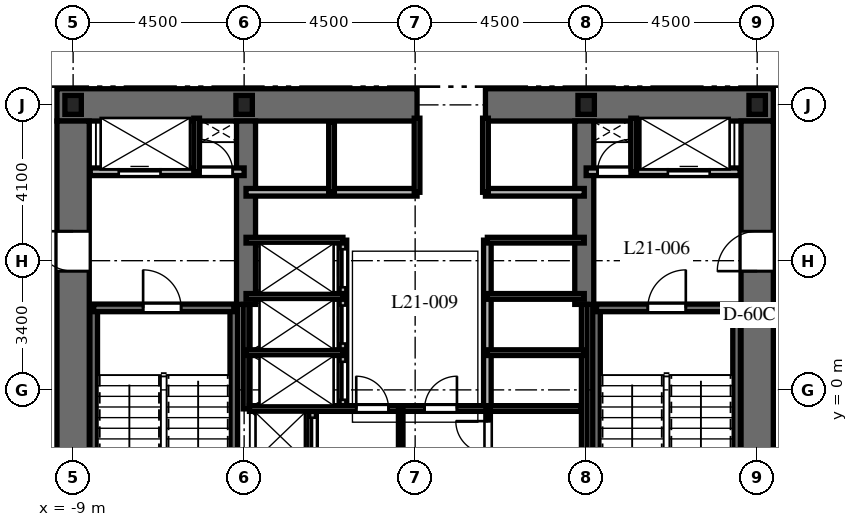
"""IFC4 building model, lengths in metres.
Left out: names, types, materials, properties, quantities, classifications, styles, units other than length and angle.
Written with IfcOpenShell. Run it as: python <this file> out.ifc"""

import sys

from ifc_helpers import new_model, si_unit, direction, frame, frame_2d, origin, origin_2d, place, context, subcontext, project, spatial, rectangle, i_section, extrude, element, fill, save


model = new_model("IFC4")
c1 = context("Model", 3, precision=1e-05, world=origin(), true_north=direction((0.0, 1.0)))
c2 = subcontext(c1, "Body", "Model", "MODEL_VIEW")
j1 = project(units=[si_unit("LENGTHUNIT", "METRE"), si_unit("PLANEANGLEUNIT", "RADIAN")], contexts=[c1])
p1 = place(None, origin())
s1 = spatial("IfcSite", under=j1, at=p1, CompositionType="ELEMENT")
p2 = place(p1, origin())
s2 = spatial("IfcBuilding", under=s1, at=p2, CompositionType="ELEMENT")
p3 = place(p2, frame((0.0, 0.0, 91.4)))
s3 = spatial("IfcBuildingStorey", under=s2, at=p3, CompositionType="ELEMENT", Elevation=91.4)
p4 = place(p3, frame((-9.425, 7.5, 0.0), z_axis=(0.0, 0.0, 1.0), x_axis=(1.0, 0.0, 0.0)))
e1 = element("IfcWall", 1, at=p4, inside=s3, PredefinedType="SHEAR", context=c2, shape_type="SweptSolid", body=[
    extrude(rectangle(XDim=9.475, YDim=0.85, at=frame_2d((4.738, 0.0))), origin(), (0.0, 0.0, 1.0), 3.7),
])
p5 = place(p3, frame((1.85, 7.5, 0.0), z_axis=(0.0, 0.0, 1.0), x_axis=(1.0, 0.0, 0.0)))
e2 = element("IfcWall", 2, at=p5, inside=s3, PredefinedType="SHEAR", context=c2, shape_type="SweptSolid", body=[
    extrude(rectangle(XDim=7.575, YDim=0.85, at=frame_2d((3.788, 0.0))), origin(), (0.0, 0.0, 1.0), 3.7),
])
p6 = place(p3, frame((-9.0, -7.075, 0.0), z_axis=(0.0, 0.0, 1.0), x_axis=(0.0, 1.0, 0.0)))
e3 = element("IfcWall", 3, at=p6, inside=s3, PredefinedType="SHEAR", context=c2, shape_type="SweptSolid", body=[
    extrude(rectangle(XDim=14.15, YDim=0.85, at=frame_2d((7.075, 0.0))), origin(), (0.0, 0.0, 1.0), 3.7),
])
p7 = place(p6, frame((10.2, 0.0, 0.0)))
e4 = element("IfcOpeningElement", 4, at=p7, cuts=e3, PredefinedType="OPENING", context=c2, shape_type="SweptSolid", body=[
    extrude(rectangle(XDim=1.05, YDim=2.15, at=frame_2d((0.525, 1.075))), frame((0.0, 0.435, 0.0), z_axis=(0.0, -1.0, 0.0), x_axis=(1.0, 0.0, 0.0)), (0.0, 0.0, 1.0), 0.87),
])
p8 = place(p3, frame((9.0, -7.075, 0.0), z_axis=(0.0, 0.0, 1.0), x_axis=(0.0, 1.0, 0.0)))
e5 = element("IfcWall", 5, at=p8, inside=s3, PredefinedType="SHEAR", context=c2, shape_type="SweptSolid", body=[
    extrude(rectangle(XDim=14.15, YDim=0.85, at=frame_2d((7.075, 0.0))), origin(), (0.0, 0.0, 1.0), 3.7),
])
p9 = place(p8, frame((10.2, 0.0, 0.0)))
e6 = element("IfcOpeningElement", 6, at=p9, cuts=e5, PredefinedType="OPENING", context=c2, shape_type="SweptSolid", body=[
    extrude(rectangle(XDim=1.05, YDim=2.15, at=frame_2d((0.525, 1.075))), frame((0.0, 0.435, 0.0), z_axis=(0.0, -1.0, 0.0), x_axis=(1.0, 0.0, 0.0)), (0.0, 0.0, 1.0), 0.87),
])
for number, where, z_axis, x_axis in (
    (7, (-4.45, 2.25, 0.0), (0.0, 0.0, 1.0), (0.0, 1.0, 0.0)),
    (8, (4.45, 2.25, 0.0), (0.0, 0.0, 1.0), (0.0, 1.0, 0.0)),
):
    element("IfcWall", number, at=place(p3, frame(where, z_axis=z_axis, x_axis=x_axis)), inside=s3, PredefinedType="SHEAR", context=c2, shape_type="SweptSolid", body=[
        extrude(rectangle(XDim=4.825, YDim=0.5, at=frame_2d((2.413, 0.0))), origin(), (0.0, 0.0, 1.0), 3.7),
    ])
for number, where, z_axis, x_axis in (
    (9, (-8.458, -6.985, 0.0), (0.0, 0.0, 1.0), (0.0, 1.0, 0.0)),
    (10, (-4.772, -6.985, 0.0), (0.0, 0.0, 1.0), (0.0, 1.0, 0.0)),
):
    element("IfcWall", number, at=place(p3, frame(where, z_axis=z_axis, x_axis=x_axis)), inside=s3, PredefinedType="SHEAR", context=c2, shape_type="SweptSolid", body=[
        extrude(rectangle(XDim=9.143, YDim=0.2, at=frame_2d((4.572, 0.0))), origin(), (0.0, 0.0, 1.0), 3.7),
    ])
p10 = place(p3, frame((-8.458, 2.158, 0.0), z_axis=(0.0, 0.0, 1.0), x_axis=(1.0, 0.0, 0.0)))
e11 = element("IfcWall", 11, at=p10, inside=s3, PredefinedType="SHEAR", context=c2, shape_type="SweptSolid", body=[
    extrude(rectangle(XDim=3.686, YDim=0.2, at=frame_2d((1.843, 0.0))), origin(), (0.0, 0.0, 1.0), 3.7),
])
p11 = place(p10, frame((1.3, 0.0, 0.0)))
e12 = element("IfcOpeningElement", 12, at=p11, cuts=e11, PredefinedType="OPENING", context=c2, shape_type="SweptSolid", body=[
    extrude(rectangle(XDim=1.0, YDim=2.15, at=frame_2d((0.5, 1.075))), frame((0.0, 0.11, 0.0), z_axis=(0.0, -1.0, 0.0), x_axis=(1.0, 0.0, 0.0)), (0.0, 0.0, 1.0), 0.22),
])
for number, where, z_axis, x_axis in (
    (13, (4.772, -6.985, 0.0), (0.0, 0.0, 1.0), (0.0, 1.0, 0.0)),
    (14, (8.458, -6.985, 0.0), (0.0, 0.0, 1.0), (0.0, 1.0, 0.0)),
):
    element("IfcWall", number, at=place(p3, frame(where, z_axis=z_axis, x_axis=x_axis)), inside=s3, PredefinedType="SHEAR", context=c2, shape_type="SweptSolid", body=[
        extrude(rectangle(XDim=9.143, YDim=0.2, at=frame_2d((4.572, 0.0))), origin(), (0.0, 0.0, 1.0), 3.7),
    ])
p12 = place(p3, frame((4.772, 2.158, 0.0), z_axis=(0.0, 0.0, 1.0), x_axis=(1.0, 0.0, 0.0)))
e15 = element("IfcWall", 15, at=p12, inside=s3, PredefinedType="SHEAR", context=c2, shape_type="SweptSolid", body=[
    extrude(rectangle(XDim=3.686, YDim=0.2, at=frame_2d((1.843, 0.0))), origin(), (0.0, 0.0, 1.0), 3.7),
])
p13 = place(p12, frame((1.35, 0.0, 0.0)))
e16 = element("IfcOpeningElement", 16, at=p13, cuts=e15, PredefinedType="OPENING", context=c2, shape_type="SweptSolid", body=[
    extrude(rectangle(XDim=1.0, YDim=2.15, at=frame_2d((0.5, 1.075))), frame((0.0, 0.11, 0.0), z_axis=(0.0, -1.0, 0.0), x_axis=(1.0, 0.0, 0.0)), (0.0, 0.0, 1.0), 0.22),
])
for number, where, z_axis, x_axis in (
    (17, (9.0, 7.5, 0.0), (0.0, 0.0, 1.0), (1.0, 0.0, 0.0)),
    (18, (4.5, 7.5, 0.0), (0.0, 0.0, 1.0), (1.0, 0.0, 0.0)),
    (19, (-4.5, 7.5, 0.0), (0.0, 0.0, 1.0), (1.0, 0.0, 0.0)),
    (20, (-9.0, 7.5, 0.0), (0.0, 0.0, 1.0), (1.0, 0.0, 0.0)),
):
    element("IfcColumn", number, at=place(p3, frame(where, z_axis=z_axis, x_axis=x_axis)), inside=s3, PredefinedType="COLUMN", context=c2, shape_type="SweptSolid", body=[
        extrude(i_section(OverallWidth=0.432, OverallDepth=0.498, WebThickness=0.056, FlangeThickness=0.089, at=origin_2d()), origin(), (0.0, 0.0, 1.0), 3.7),
    ])
p14 = place(p3, frame((-8.55, 5.74, 0.0), z_axis=(0.0, 0.0, 1.0), x_axis=(1.0, 0.0, 0.0)))
e21 = element("IfcWall", 21, at=p14, inside=s3, PredefinedType="PARTITIONING", context=c2, shape_type="SweptSolid", body=[
    extrude(rectangle(XDim=4.05, YDim=0.2, at=frame_2d((2.025, 0.0))), origin(), (0.0, 0.0, 1.0), 3.4),
])
p15 = place(p14, frame((0.75, 0.0, 0.0)))
e22 = element("IfcOpeningElement", 22, at=p15, cuts=e21, PredefinedType="OPENING", context=c2, shape_type="SweptSolid", body=[
    extrude(rectangle(XDim=1.1, YDim=2.2, at=frame_2d((0.55, 1.1))), frame((0.0, 0.11, 0.0), z_axis=(0.0, -1.0, 0.0), x_axis=(1.0, 0.0, 0.0)), (0.0, 0.0, 1.0), 0.22),
])
p16 = place(p14, frame((2.9, 0.0, 0.0)))
e23 = element("IfcOpeningElement", 23, at=p16, cuts=e21, PredefinedType="OPENING", context=c2, shape_type="SweptSolid", body=[
    extrude(rectangle(XDim=0.85, YDim=2.03, at=frame_2d((0.425, 1.015))), frame((0.0, 0.11, 0.0), z_axis=(0.0, -1.0, 0.0), x_axis=(1.0, 0.0, 0.0)), (0.0, 0.0, 1.0), 0.22),
])
p17 = place(p3, frame((-5.75, 5.74, 0.0), z_axis=(0.0, 0.0, 1.0), x_axis=(0.0, 1.0, 0.0)))
e24 = element("IfcWall", 24, at=p17, inside=s3, PredefinedType="PARTITIONING", context=c2, shape_type="SweptSolid", body=[
    extrude(rectangle(XDim=1.41, YDim=0.15, at=frame_2d((0.705, 0.0))), origin(), (0.0, 0.0, 1.0), 3.4),
])
p18 = place(p3, frame((4.5, 5.74, 0.0), z_axis=(0.0, 0.0, 1.0), x_axis=(1.0, 0.0, 0.0)))
e25 = element("IfcWall", 25, at=p18, inside=s3, PredefinedType="PARTITIONING", context=c2, shape_type="SweptSolid", body=[
    extrude(rectangle(XDim=4.05, YDim=0.2, at=frame_2d((2.025, 0.0))), origin(), (0.0, 0.0, 1.0), 3.4),
])
p19 = place(p18, frame((0.3, 0.0, 0.0)))
e26 = element("IfcOpeningElement", 26, at=p19, cuts=e25, PredefinedType="OPENING", context=c2, shape_type="SweptSolid", body=[
    extrude(rectangle(XDim=0.85, YDim=2.03, at=frame_2d((0.425, 1.015))), frame((0.0, 0.11, 0.0), z_axis=(0.0, -1.0, 0.0), x_axis=(1.0, 0.0, 0.0)), (0.0, 0.0, 1.0), 0.22),
])
p20 = place(p18, frame((2.15, 0.0, 0.0)))
e27 = element("IfcOpeningElement", 27, at=p20, cuts=e25, PredefinedType="OPENING", context=c2, shape_type="SweptSolid", body=[
    extrude(rectangle(XDim=1.1, YDim=2.2, at=frame_2d((0.55, 1.1))), frame((0.0, 0.11, 0.0), z_axis=(0.0, -1.0, 0.0), x_axis=(1.0, 0.0, 0.0)), (0.0, 0.0, 1.0), 0.22),
])
p21 = place(p3, frame((5.75, 5.74, 0.0), z_axis=(0.0, 0.0, 1.0), x_axis=(0.0, 1.0, 0.0)))
e28 = element("IfcWall", 28, at=p21, inside=s3, PredefinedType="PARTITIONING", context=c2, shape_type="SweptSolid", body=[
    extrude(rectangle(XDim=1.41, YDim=0.15, at=frame_2d((0.705, 0.0))), origin(), (0.0, 0.0, 1.0), 3.4),
])
p22 = place(p3, frame((-2.7, -1.972, 0.0), z_axis=(0.0, 0.0, 1.0), x_axis=(0.0, 1.0, 0.0)))
e29 = element("IfcWall", 29, at=p22, inside=s3, PredefinedType="PARTITIONING", context=c2, shape_type="SweptSolid", body=[
    extrude(rectangle(XDim=1.472, YDim=0.2, at=frame_2d((0.736, 0.0))), origin(), (0.0, 0.0, 1.0), 3.4),
])
p23 = place(p22, frame((0.24, 0.0, 0.0)))
e30 = element("IfcOpeningElement", 30, at=p23, cuts=e29, PredefinedType="OPENING", context=c2, shape_type="SweptSolid", body=[
    extrude(rectangle(XDim=1.0, YDim=2.2, at=frame_2d((0.5, 1.1))), frame((0.0, 0.11, 0.0), z_axis=(0.0, -1.0, 0.0), x_axis=(1.0, 0.0, 0.0)), (0.0, 0.0, 1.0), 0.22),
])
p24 = place(p3, frame((-4.45, 5.2, 0.0), z_axis=(0.0, 0.0, 1.0), x_axis=(1.0, 0.0, 0.0)))
e31 = element("IfcWall", 31, at=p24, inside=s3, PredefinedType="PARTITIONING", context=c2, shape_type="SweptSolid", body=[
    extrude(rectangle(XDim=4.5, YDim=0.2, at=frame_2d((2.25, 0.0))), origin(), (0.0, 0.0, 1.0), 3.4),
])
p25 = place(p3, frame((1.85, 5.2, 0.0), z_axis=(0.0, 0.0, 1.0), x_axis=(1.0, 0.0, 0.0)))
e32 = element("IfcWall", 32, at=p25, inside=s3, PredefinedType="PARTITIONING", context=c2, shape_type="SweptSolid", body=[
    extrude(rectangle(XDim=2.6, YDim=0.2, at=frame_2d((1.3, 0.0))), origin(), (0.0, 0.0, 1.0), 3.4),
])
p26 = place(p3, frame((-2.2, 5.2, 0.0), z_axis=(0.0, 0.0, 1.0), x_axis=(0.0, 1.0, 0.0)))
e33 = element("IfcWall", 33, at=p26, inside=s3, PredefinedType="PARTITIONING", context=c2, shape_type="SweptSolid", body=[
    extrude(rectangle(XDim=1.85, YDim=0.15, at=frame_2d((0.925, 0.0))), origin(), (0.0, 0.0, 1.0), 3.4),
])
for number, where, z_axis, x_axis in (
    (34, (0.05, 5.2, 0.0), (0.0, 0.0, 1.0), (0.0, 1.0, 0.0)),
    (35, (1.85, 5.2, 0.0), (0.0, 0.0, 1.0), (0.0, 1.0, 0.0)),
):
    element("IfcWall", number, at=place(p3, frame(where, z_axis=z_axis, x_axis=x_axis)), inside=s3, PredefinedType="PARTITIONING", context=c2, shape_type="SweptSolid", body=[
        extrude(rectangle(XDim=1.95, YDim=0.15, at=frame_2d((0.975, 0.0))), origin(), (0.0, 0.0, 1.0), 3.4),
    ])
p27 = place(p3, frame((-4.45, -0.5, 0.0), z_axis=(0.0, 0.0, 1.0), x_axis=(0.0, 1.0, 0.0)))
e36 = element("IfcWall", 36, at=p27, inside=s3, PredefinedType="PARTITIONING", context=c2, shape_type="SweptSolid", body=[
    extrude(rectangle(XDim=2.75, YDim=0.15, at=frame_2d((1.375, 0.0))), origin(), (0.0, 0.0, 1.0), 3.4),
])
p28 = place(p3, frame((4.45, -1.972, 0.0), z_axis=(0.0, 0.0, 1.0), x_axis=(0.0, 1.0, 0.0)))
e37 = element("IfcWall", 37, at=p28, inside=s3, PredefinedType="PARTITIONING", context=c2, shape_type="SweptSolid", body=[
    extrude(rectangle(XDim=4.222, YDim=0.15, at=frame_2d((2.111, 0.0))), origin(), (0.0, 0.0, 1.0), 3.4),
])
p29 = place(p3, frame((-1.9, -0.5, 0.0), z_axis=(0.0, 0.0, 1.0), x_axis=(0.0, 1.0, 0.0)))
e38 = element("IfcWall", 38, at=p29, inside=s3, PredefinedType="PARTITIONING", context=c2, shape_type="SweptSolid", body=[
    extrude(rectangle(XDim=4.44, YDim=0.2, at=frame_2d((2.22, 0.0))), origin(), (0.0, 0.0, 1.0), 3.4),
])
p30 = place(p29, frame((0.24, 0.0, 0.0)))
e39 = element("IfcOpeningElement", 39, at=p30, cuts=e38, PredefinedType="OPENING", context=c2, shape_type="SweptSolid", body=[
    extrude(rectangle(XDim=1.0, YDim=2.2, at=frame_2d((0.5, 1.1))), frame((0.0, 0.11, 0.0), z_axis=(0.0, -1.0, 0.0), x_axis=(1.0, 0.0, 0.0)), (0.0, 0.0, 1.0), 0.22),
])
p31 = place(p29, frame((1.72, 0.0, 0.0)))
e40 = element("IfcOpeningElement", 40, at=p31, cuts=e38, PredefinedType="OPENING", context=c2, shape_type="SweptSolid", body=[
    extrude(rectangle(XDim=1.0, YDim=2.2, at=frame_2d((0.5, 1.1))), frame((0.0, 0.11, 0.0), z_axis=(0.0, -1.0, 0.0), x_axis=(1.0, 0.0, 0.0)), (0.0, 0.0, 1.0), 0.22),
])
p32 = place(p29, frame((3.2, 0.0, 0.0)))
e41 = element("IfcOpeningElement", 41, at=p32, cuts=e38, PredefinedType="OPENING", context=c2, shape_type="SweptSolid", body=[
    extrude(rectangle(XDim=1.0, YDim=2.2, at=frame_2d((0.5, 1.1))), frame((0.0, 0.11, 0.0), z_axis=(0.0, -1.0, 0.0), x_axis=(1.0, 0.0, 0.0)), (0.0, 0.0, 1.0), 0.22),
])
for number, where, z_axis, x_axis in (
    (42, (-4.45, 3.94, 0.0), (0.0, 0.0, 1.0), (1.0, 0.0, 0.0)),
    (43, (-4.45, 0.98, 0.0), (0.0, 0.0, 1.0), (1.0, 0.0, 0.0)),
    (44, (-4.45, 2.46, 0.0), (0.0, 0.0, 1.0), (1.0, 0.0, 0.0)),
):
    element("IfcWall", number, at=place(p3, frame(where, z_axis=z_axis, x_axis=x_axis)), inside=s3, PredefinedType="PARTITIONING", context=c2, shape_type="SweptSolid", body=[
        extrude(rectangle(XDim=2.55, YDim=0.15, at=frame_2d((1.275, 0.0))), origin(), (0.0, 0.0, 1.0), 3.4),
    ])
p33 = place(p3, frame((1.9, -0.5, 0.0), z_axis=(0.0, 0.0, 1.0), x_axis=(0.0, 1.0, 0.0)))
e45 = element("IfcWall", 45, at=p33, inside=s3, PredefinedType="PARTITIONING", context=c2, shape_type="SweptSolid", body=[
    extrude(rectangle(XDim=4.44, YDim=0.2, at=frame_2d((2.22, 0.0))), origin(), (0.0, 0.0, 1.0), 3.4),
])
for number, where, z_axis, x_axis in (
    (46, (1.9, 3.94, 0.0), (0.0, 0.0, 1.0), (1.0, 0.0, 0.0)),
    (47, (1.9, 0.98, 0.0), (0.0, 0.0, 1.0), (1.0, 0.0, 0.0)),
    (48, (1.9, 2.46, 0.0), (0.0, 0.0, 1.0), (1.0, 0.0, 0.0)),
):
    element("IfcWall", number, at=place(p3, frame(where, z_axis=z_axis, x_axis=x_axis)), inside=s3, PredefinedType="PARTITIONING", context=c2, shape_type="SweptSolid", body=[
        extrude(rectangle(XDim=2.55, YDim=0.15, at=frame_2d((1.275, 0.0))), origin(), (0.0, 0.0, 1.0), 3.4),
    ])
p34 = place(p3, frame((-4.36, -0.49, 0.0), z_axis=(0.0, 0.0, 1.0), x_axis=(1.0, 0.0, 0.0)))
e49 = element("IfcWall", 49, at=p34, inside=s3, PredefinedType="PARTITIONING", context=c2, shape_type="SweptSolid", body=[
    extrude(rectangle(XDim=8.72, YDim=0.15, at=frame_2d((4.36, 0.0))), origin(), (0.0, 0.0, 1.0), 3.4),
])
p35 = place(p34, frame((2.81, 0.0, 0.0)))
e50 = element("IfcOpeningElement", 50, at=p35, cuts=e49, PredefinedType="OPENING", context=c2, shape_type="SweptSolid", body=[
    extrude(rectangle(XDim=0.85, YDim=2.03, at=frame_2d((0.425, 1.015))), frame((0.0, 0.085, 0.0), z_axis=(0.0, -1.0, 0.0), x_axis=(1.0, 0.0, 0.0)), (0.0, 0.0, 1.0), 0.17),
])
p36 = place(p34, frame((4.61, 0.0, 0.0)))
e51 = element("IfcOpeningElement", 51, at=p36, cuts=e49, PredefinedType="OPENING", context=c2, shape_type="SweptSolid", body=[
    extrude(rectangle(XDim=0.85, YDim=2.03, at=frame_2d((0.425, 1.015))), frame((0.0, 0.085, 0.0), z_axis=(0.0, -1.0, 0.0), x_axis=(1.0, 0.0, 0.0)), (0.0, 0.0, 1.0), 0.17),
])
p37 = place(p3, frame((-0.38, -1.972, 0.0), z_axis=(0.0, 0.0, 1.0), x_axis=(0.0, 1.0, 0.0)))
e52 = element("IfcWall", 52, at=p37, inside=s3, PredefinedType="PARTITIONING", context=c2, shape_type="SweptSolid", body=[
    extrude(rectangle(XDim=1.472, YDim=0.12, at=frame_2d((0.736, 0.0))), origin(), (0.0, 0.0, 1.0), 3.4),
])
p38 = place(p3, frame((1.92, -1.972, 0.0), z_axis=(0.0, 0.0, 1.0), x_axis=(0.0, 1.0, 0.0)))
e53 = element("IfcWall", 53, at=p38, inside=s3, PredefinedType="PARTITIONING", context=c2, shape_type="SweptSolid", body=[
    extrude(rectangle(XDim=1.472, YDim=0.12, at=frame_2d((0.736, 0.0))), origin(), (0.0, 0.0, 1.0), 3.4),
])
p39 = place(p38, frame((0.3, 0.0, 0.0)))
e54 = element("IfcOpeningElement", 54, at=p39, cuts=e53, PredefinedType="OPENING", context=c2, shape_type="SweptSolid", body=[
    extrude(rectangle(XDim=0.85, YDim=2.03, at=frame_2d((0.425, 1.015))), frame((0.0, 0.07, 0.0), z_axis=(0.0, -1.0, 0.0), x_axis=(1.0, 0.0, 0.0)), (0.0, 0.0, 1.0), 0.14),
])
p40 = place(p11, origin())
e55 = element("IfcDoor", 55, at=p40, inside=s3, OperationType="SINGLE_SWING_LEFT", PredefinedType="DOOR", context=c2, shape_type="SweptSolid", body=[
    extrude(rectangle(XDim=1.0, YDim=2.15, at=frame_2d((0.5, 1.075))), frame((0.0, 0.025, 0.0), z_axis=(0.0, -1.0, 0.0), x_axis=(1.0, 0.0, 0.0)), (0.0, 0.0, 1.0), 0.05),
])
fill(e12, e55)
p41 = place(p13, origin())
e56 = element("IfcDoor", 56, at=p41, inside=s3, OperationType="SINGLE_SWING_RIGHT", PredefinedType="DOOR", context=c2, shape_type="SweptSolid", body=[
    extrude(rectangle(XDim=1.0, YDim=2.15, at=frame_2d((0.5, 1.075))), frame((0.0, 0.025, 0.0), z_axis=(0.0, -1.0, 0.0), x_axis=(1.0, 0.0, 0.0)), (0.0, 0.0, 1.0), 0.05),
])
fill(e16, e56)
p42 = place(p7, origin())
e57 = element("IfcDoor", 57, at=p42, inside=s3, OperationType="SINGLE_SWING_RIGHT", PredefinedType="DOOR", context=c2, shape_type="SweptSolid", body=[
    extrude(rectangle(XDim=1.05, YDim=2.15, at=frame_2d((0.525, 1.075))), frame((0.0, 0.025, 0.0), z_axis=(0.0, -1.0, 0.0), x_axis=(1.0, 0.0, 0.0)), (0.0, 0.0, 1.0), 0.05),
])
fill(e4, e57)
p43 = place(p9, origin())
e58 = element("IfcDoor", 58, at=p43, inside=s3, OperationType="SINGLE_SWING_LEFT", PredefinedType="DOOR", context=c2, shape_type="SweptSolid", body=[
    extrude(rectangle(XDim=1.05, YDim=2.15, at=frame_2d((0.525, 1.075))), frame((0.0, 0.025, 0.0), z_axis=(0.0, -1.0, 0.0), x_axis=(1.0, 0.0, 0.0)), (0.0, 0.0, 1.0), 0.05),
])
fill(e6, e58)
p44 = place(p15, origin())
e59 = element("IfcDoor", 59, at=p44, inside=s3, OperationType="SLIDING_TO_LEFT", PredefinedType="DOOR", context=c2, shape_type="SweptSolid", body=[
    extrude(rectangle(XDim=1.1, YDim=2.2, at=frame_2d((0.55, 1.1))), frame((0.0, 0.025, 0.0), z_axis=(0.0, -1.0, 0.0), x_axis=(1.0, 0.0, 0.0)), (0.0, 0.0, 1.0), 0.05),
])
fill(e22, e59)
p45 = place(p16, origin())
e60 = element("IfcDoor", 60, at=p45, inside=s3, OperationType="SINGLE_SWING_LEFT", PredefinedType="DOOR", context=c2, shape_type="SweptSolid", body=[
    extrude(rectangle(XDim=0.85, YDim=2.03, at=frame_2d((0.425, 1.015))), frame((0.0, 0.025, 0.0), z_axis=(0.0, -1.0, 0.0), x_axis=(1.0, 0.0, 0.0)), (0.0, 0.0, 1.0), 0.05),
])
fill(e23, e60)
p46 = place(p19, origin())
e61 = element("IfcDoor", 61, at=p46, inside=s3, OperationType="SINGLE_SWING_RIGHT", PredefinedType="DOOR", context=c2, shape_type="SweptSolid", body=[
    extrude(rectangle(XDim=0.85, YDim=2.03, at=frame_2d((0.425, 1.015))), frame((0.0, 0.025, 0.0), z_axis=(0.0, -1.0, 0.0), x_axis=(1.0, 0.0, 0.0)), (0.0, 0.0, 1.0), 0.05),
])
fill(e26, e61)
p47 = place(p20, origin())
e62 = element("IfcDoor", 62, at=p47, inside=s3, OperationType="SLIDING_TO_RIGHT", PredefinedType="DOOR", context=c2, shape_type="SweptSolid", body=[
    extrude(rectangle(XDim=1.1, YDim=2.2, at=frame_2d((0.55, 1.1))), frame((0.0, 0.025, 0.0), z_axis=(0.0, -1.0, 0.0), x_axis=(1.0, 0.0, 0.0)), (0.0, 0.0, 1.0), 0.05),
])
fill(e27, e62)
p48 = place(p23, origin())
e63 = element("IfcDoor", 63, at=p48, inside=s3, OperationType="SLIDING_TO_LEFT", PredefinedType="DOOR", context=c2, shape_type="SweptSolid", body=[
    extrude(rectangle(XDim=1.0, YDim=2.2, at=frame_2d((0.5, 1.1))), frame((0.0, 0.025, 0.0), z_axis=(0.0, -1.0, 0.0), x_axis=(1.0, 0.0, 0.0)), (0.0, 0.0, 1.0), 0.05),
])
fill(e30, e63)
p49 = place(p30, origin())
e64 = element("IfcDoor", 64, at=p49, inside=s3, OperationType="SLIDING_TO_LEFT", PredefinedType="DOOR", context=c2, shape_type="SweptSolid", body=[
    extrude(rectangle(XDim=1.0, YDim=2.2, at=frame_2d((0.5, 1.1))), frame((0.0, 0.025, 0.0), z_axis=(0.0, -1.0, 0.0), x_axis=(1.0, 0.0, 0.0)), (0.0, 0.0, 1.0), 0.05),
])
fill(e39, e64)
p50 = place(p31, origin())
e65 = element("IfcDoor", 65, at=p50, inside=s3, OperationType="SLIDING_TO_LEFT", PredefinedType="DOOR", context=c2, shape_type="SweptSolid", body=[
    extrude(rectangle(XDim=1.0, YDim=2.2, at=frame_2d((0.5, 1.1))), frame((0.0, 0.025, 0.0), z_axis=(0.0, -1.0, 0.0), x_axis=(1.0, 0.0, 0.0)), (0.0, 0.0, 1.0), 0.05),
])
fill(e40, e65)
p51 = place(p32, origin())
e66 = element("IfcDoor", 66, at=p51, inside=s3, OperationType="SLIDING_TO_LEFT", PredefinedType="DOOR", context=c2, shape_type="SweptSolid", body=[
    extrude(rectangle(XDim=1.0, YDim=2.2, at=frame_2d((0.5, 1.1))), frame((0.0, 0.025, 0.0), z_axis=(0.0, -1.0, 0.0), x_axis=(1.0, 0.0, 0.0)), (0.0, 0.0, 1.0), 0.05),
])
fill(e41, e66)
p52 = place(p35, origin())
e67 = element("IfcDoor", 67, at=p52, inside=s3, OperationType="SINGLE_SWING_LEFT", PredefinedType="DOOR", context=c2, shape_type="SweptSolid", body=[
    extrude(rectangle(XDim=0.85, YDim=2.03, at=frame_2d((0.425, 1.015))), frame((0.0, 0.025, 0.0), z_axis=(0.0, -1.0, 0.0), x_axis=(1.0, 0.0, 0.0)), (0.0, 0.0, 1.0), 0.05),
])
fill(e50, e67)
p53 = place(p36, origin())
e68 = element("IfcDoor", 68, at=p53, inside=s3, OperationType="SINGLE_SWING_RIGHT", PredefinedType="DOOR", context=c2, shape_type="SweptSolid", body=[
    extrude(rectangle(XDim=0.85, YDim=2.03, at=frame_2d((0.425, 1.015))), frame((0.0, 0.025, 0.0), z_axis=(0.0, -1.0, 0.0), x_axis=(1.0, 0.0, 0.0)), (0.0, 0.0, 1.0), 0.05),
])
fill(e51, e68)
p54 = place(p39, origin())
e69 = element("IfcDoor", 69, at=p54, inside=s3, OperationType="SINGLE_SWING_RIGHT", PredefinedType="DOOR", context=c2, shape_type="SweptSolid", body=[
    extrude(rectangle(XDim=0.85, YDim=2.03, at=frame_2d((0.425, 1.015))), frame((0.0, 0.025, 0.0), z_axis=(0.0, -1.0, 0.0), x_axis=(1.0, 0.0, 0.0)), (0.0, 0.0, 1.0), 0.05),
])
fill(e54, e69)
save(model, sys.argv[1])
